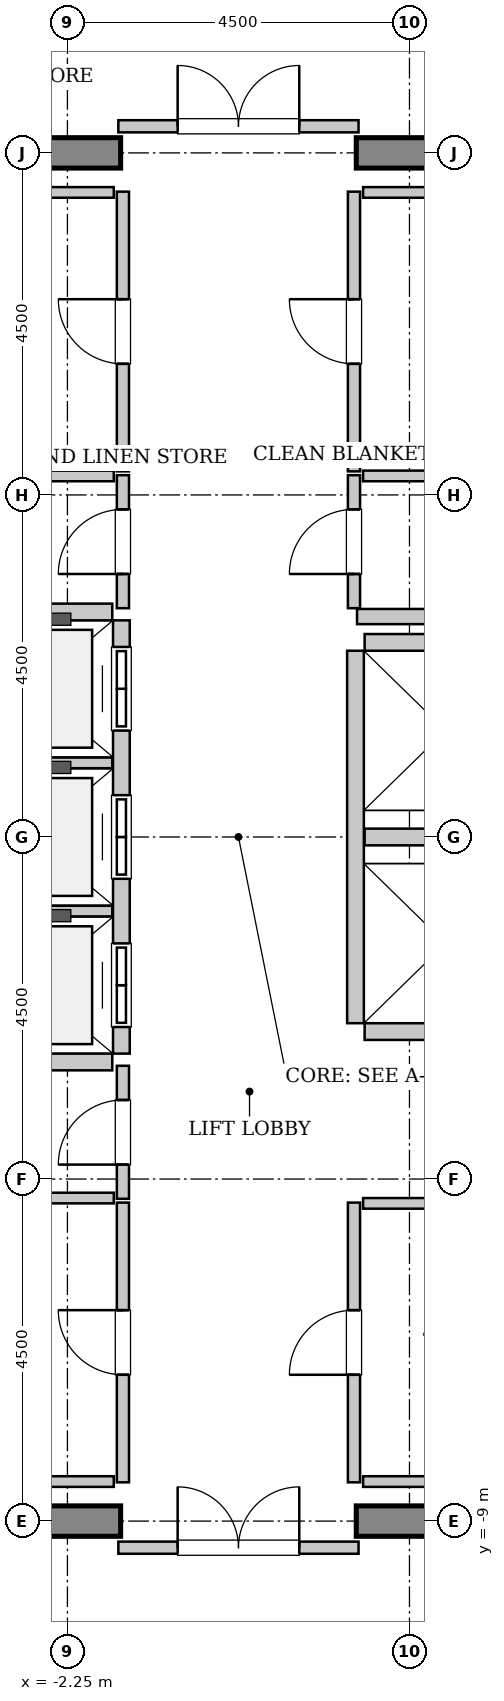
"""IFC4 building model, lengths in metres.
Left out: names, types, materials, properties, quantities, classifications, styles, units other than length and angle.
Written with IfcOpenShell. Run it as: python <this file> out.ifc"""

import sys

from ifc_helpers import new_model, si_unit, direction, frame, frame_2d, origin, place, context, subcontext, project, spatial, rectangle, extrude, source, transform, mapped, element, fill, save


model = new_model("IFC4")
c1 = context("Model", 3, precision=1e-05, world=origin(), true_north=direction((0.0, 1.0)))
c2 = subcontext(c1, "Body", "Model", "MODEL_VIEW")
j1 = project(units=[si_unit("LENGTHUNIT", "METRE"), si_unit("PLANEANGLEUNIT", "RADIAN")], contexts=[c1])
p1 = place(None, origin())
s1 = spatial("IfcSite", under=j1, at=p1, CompositionType="ELEMENT")
p2 = place(p1, origin())
s2 = spatial("IfcBuilding", under=s1, at=p2, CompositionType="ELEMENT")
p3 = place(p2, frame((0.0, 0.0, 333.8)))
s3 = spatial("IfcBuildingStorey", under=s2, at=p3, CompositionType="ELEMENT", Elevation=333.8)
m1 = source(origin(), c2, "Body", "SweptSolid", [
    extrude(rectangle(XDim=9.9, YDim=0.4, at=frame_2d((4.95, 0.0))), origin(), (0.0, 0.0, 1.0), 3.8),
])
for number, where, z_axis, x_axis in (
    (1, (-11.45, 9.0, 0.0), (0.0, 0.0, 1.0), (1.0, 0.0, 0.0)),
    (2, (1.55, 9.0, 0.0), (0.0, 0.0, 1.0), (1.0, 0.0, 0.0)),
    (3, (-11.45, -9.0, 0.0), (0.0, 0.0, 1.0), (1.0, 0.0, 0.0)),
    (4, (1.55, -9.0, 0.0), (0.0, 0.0, 1.0), (1.0, 0.0, 0.0)),
):
    element("IfcWall", number, at=place(p3, frame(where, z_axis=z_axis, x_axis=x_axis)), inside=s3, PredefinedType="SHEAR", context=c2, shape_type="MappedRepresentation", body=[
        mapped(m1, transform((0.0, 0.0, 0.0), x_axis=(1.0, 0.0, 0.0), y_axis=(0.0, 1.0, 0.0), z_axis=(0.0, 0.0, 1.0), scale=1.0)),
    ])
m2 = source(origin(), c2, "Body", "SweptSolid", [
    extrude(rectangle(XDim=5.7, YDim=0.22, at=frame_2d((2.85, 0.0))), origin(), (0.0, 0.0, 1.0), 3.535),
])
p4 = place(p3, frame((-1.54, -2.85, 0.0), z_axis=(0.0, 0.0, 1.0), x_axis=(0.0, 1.0, 0.0)))
e5 = element("IfcWall", 5, at=p4, inside=s3, PredefinedType="SOLIDWALL", context=c2, shape_type="MappedRepresentation", body=[
    mapped(m2, transform((0.0, 0.0, 0.0), x_axis=(1.0, 0.0, 0.0), y_axis=(0.0, 1.0, 0.0), z_axis=(0.0, 0.0, 1.0), scale=1.0)),
])
p5 = place(p4, frame((0.35, 0.0, 0.0)))
e6 = element("IfcOpeningElement", 6, at=p5, cuts=e5, PredefinedType="OPENING", context=c2, shape_type="SweptSolid", body=[
    extrude(rectangle(XDim=1.1, YDim=2.2, at=frame_2d((0.55, 1.1))), frame((0.0, 0.12, 0.0), z_axis=(0.0, -1.0, 0.0), x_axis=(1.0, 0.0, 0.0)), (0.0, 0.0, 1.0), 0.24),
])
p6 = place(p4, frame((2.3, 0.0, 0.0)))
e7 = element("IfcOpeningElement", 7, at=p6, cuts=e5, PredefinedType="OPENING", context=c2, shape_type="SweptSolid", body=[
    extrude(rectangle(XDim=1.1, YDim=2.2, at=frame_2d((0.55, 1.1))), frame((0.0, 0.12, 0.0), z_axis=(0.0, -1.0, 0.0), x_axis=(1.0, 0.0, 0.0)), (0.0, 0.0, 1.0), 0.24),
])
p7 = place(p4, frame((4.25, 0.0, 0.0)))
e8 = element("IfcOpeningElement", 8, at=p7, cuts=e5, PredefinedType="OPENING", context=c2, shape_type="SweptSolid", body=[
    extrude(rectangle(XDim=1.1, YDim=2.2, at=frame_2d((0.55, 1.1))), frame((0.0, 0.12, 0.0), z_axis=(0.0, -1.0, 0.0), x_axis=(1.0, 0.0, 0.0)), (0.0, 0.0, 1.0), 0.24),
])
m3 = source(origin(), c2, "Body", "SweptSolid", [
    extrude(rectangle(XDim=2.13, YDim=0.22, at=frame_2d((1.065, 0.0))), origin(), (0.0, 0.0, 1.0), 3.535),
])
p8 = place(p3, frame((-3.79, -2.96, 0.0), z_axis=(0.0, 0.0, 1.0), x_axis=(1.0, 0.0, 0.0)))
e9 = element("IfcWall", 9, at=p8, inside=s3, PredefinedType="SOLIDWALL", context=c2, shape_type="MappedRepresentation", body=[
    mapped(m3, transform((0.0, 0.0, 0.0), x_axis=(1.0, 0.0, 0.0), y_axis=(0.0, 1.0, 0.0), z_axis=(0.0, 0.0, 1.0), scale=1.0)),
])
m4 = source(origin(), c2, "Body", "SweptSolid", [
    extrude(rectangle(XDim=2.13, YDim=0.14, at=frame_2d((1.065, 0.0))), origin(), (0.0, 0.0, 1.0), 3.535),
])
for number, where, z_axis, x_axis in (
    (10, (-3.79, -0.975, 0.0), (0.0, 0.0, 1.0), (1.0, 0.0, 0.0)),
    (11, (-3.79, 0.975, 0.0), (0.0, 0.0, 1.0), (1.0, 0.0, 0.0)),
):
    element("IfcWall", number, at=place(p3, frame(where, z_axis=z_axis, x_axis=x_axis)), inside=s3, PredefinedType="PARTITIONING", context=c2, shape_type="MappedRepresentation", body=[
        mapped(m4, transform((0.0, 0.0, 0.0), x_axis=(1.0, 0.0, 0.0), y_axis=(0.0, 1.0, 0.0), z_axis=(0.0, 0.0, 1.0), scale=1.0)),
    ])
p9 = place(p3, frame((-1.66, 2.96, 0.0), z_axis=(0.0, 0.0, 1.0), x_axis=(-1.0, 0.0, 0.0)))
e12 = element("IfcWall", 12, at=p9, inside=s3, PredefinedType="SOLIDWALL", context=c2, shape_type="MappedRepresentation", body=[
    mapped(m3, transform((0.0, 0.0, 0.0), x_axis=(1.0, 0.0, 0.0), y_axis=(0.0, 1.0, 0.0), z_axis=(0.0, 0.0, 1.0), scale=1.0)),
])
m5 = source(origin(), c2, "Body", "SweptSolid", [
    extrude(rectangle(XDim=4.9, YDim=0.22, at=frame_2d((2.45, 0.0))), origin(), (0.0, 0.0, 1.0), 3.535),
])
p10 = place(p3, frame((1.54, 2.45, 0.0), z_axis=(0.0, 0.0, 1.0), x_axis=(0.0, -1.0, 0.0)))
e13 = element("IfcWall", 13, at=p10, inside=s3, PredefinedType="SOLIDWALL", context=c2, shape_type="MappedRepresentation", body=[
    mapped(m5, transform((0.0, 0.0, 0.0), x_axis=(1.0, 0.0, 0.0), y_axis=(0.0, 1.0, 0.0), z_axis=(0.0, 0.0, 1.0), scale=1.0)),
])
for number, where, z_axis, x_axis in (
    (14, (1.66, -2.56, 0.0), (0.0, 0.0, 1.0), (1.0, 0.0, 0.0)),
    (15, (1.66, 0.0, 0.0), (0.0, 0.0, 1.0), (1.0, 0.0, 0.0)),
    (16, (3.79, 2.56, 0.0), (0.0, 0.0, 1.0), (-1.0, 0.0, 0.0)),
):
    element("IfcWall", number, at=place(p3, frame(where, z_axis=z_axis, x_axis=x_axis)), inside=s3, PredefinedType="SOLIDWALL", context=c2, shape_type="MappedRepresentation", body=[
        mapped(m3, transform((0.0, 0.0, 0.0), x_axis=(1.0, 0.0, 0.0), y_axis=(0.0, 1.0, 0.0), z_axis=(0.0, 0.0, 1.0), scale=1.0)),
    ])
m6 = source(origin(), c2, "Body", "SweptSolid", [
    extrude(rectangle(XDim=2.52, YDim=0.2, at=frame_2d((1.26, 0.0))), origin(), (0.0, 0.0, 1.0), 3.535),
])
p11 = place(p3, frame((1.56, 2.9, 0.0), z_axis=(0.0, 0.0, 1.0), x_axis=(1.0, 0.0, 0.0)))
e17 = element("IfcWall", 17, at=p11, inside=s3, PredefinedType="PARTITIONING", context=c2, shape_type="MappedRepresentation", body=[
    mapped(m6, transform((0.0, 0.0, 0.0), x_axis=(1.0, 0.0, 0.0), y_axis=(0.0, 1.0, 0.0), z_axis=(0.0, 0.0, 1.0), scale=1.0)),
])
m7 = source(origin(), c2, "Body", "SweptSolid", [
    extrude(rectangle(XDim=3.16, YDim=0.16, at=frame_2d((1.58, 0.0))), origin(), (0.0, 0.0, 1.0), 2.625),
])
p12 = place(p3, frame((-1.58, 9.35, 0.0), z_axis=(0.0, 0.0, 1.0), x_axis=(1.0, 0.0, 0.0)))
e18 = element("IfcWall", 18, at=p12, inside=s3, PredefinedType="PARTITIONING", context=c2, shape_type="MappedRepresentation", body=[
    mapped(m7, transform((0.0, 0.0, 0.0), x_axis=(1.0, 0.0, 0.0), y_axis=(0.0, 1.0, 0.0), z_axis=(0.0, 0.0, 1.0), scale=1.0)),
])
p13 = place(p12, frame((0.78, 0.0, 0.0)))
e19 = element("IfcOpeningElement", 19, at=p13, cuts=e18, PredefinedType="OPENING", context=c2, shape_type="SweptSolid", body=[
    extrude(rectangle(XDim=1.6, YDim=2.3, at=frame_2d((0.8, 1.15))), frame((0.0, 0.09, 0.0), z_axis=(0.0, -1.0, 0.0), x_axis=(1.0, 0.0, 0.0)), (0.0, 0.0, 1.0), 0.18),
])
p14 = place(p3, frame((-1.58, -9.35, 0.0), z_axis=(0.0, 0.0, 1.0), x_axis=(1.0, 0.0, 0.0)))
e20 = element("IfcWall", 20, at=p14, inside=s3, PredefinedType="PARTITIONING", context=c2, shape_type="MappedRepresentation", body=[
    mapped(m7, transform((0.0, 0.0, 0.0), x_axis=(1.0, 0.0, 0.0), y_axis=(0.0, 1.0, 0.0), z_axis=(0.0, 0.0, 1.0), scale=1.0)),
])
p15 = place(p14, frame((0.78, 0.0, 0.0)))
e21 = element("IfcOpeningElement", 21, at=p15, cuts=e20, PredefinedType="OPENING", context=c2, shape_type="SweptSolid", body=[
    extrude(rectangle(XDim=1.6, YDim=2.3, at=frame_2d((0.8, 1.15))), frame((0.0, 0.09, 0.0), z_axis=(0.0, -1.0, 0.0), x_axis=(1.0, 0.0, 0.0)), (0.0, 0.0, 1.0), 0.18),
])
m8 = source(origin(), c2, "Body", "SweptSolid", [
    extrude(rectangle(XDim=1.75, YDim=0.16, at=frame_2d((0.875, 0.0))), origin(), (0.0, 0.0, 1.0), 3.535),
])
p16 = place(p3, frame((-1.52, 3.01, 0.0), z_axis=(0.0, 0.0, 1.0), x_axis=(0.0, 1.0, 0.0)))
e22 = element("IfcWall", 22, at=p16, inside=s3, PredefinedType="PARTITIONING", context=c2, shape_type="MappedRepresentation", body=[
    mapped(m8, transform((0.0, 0.0, 0.0), x_axis=(1.0, 0.0, 0.0), y_axis=(0.0, 1.0, 0.0), z_axis=(0.0, 0.0, 1.0), scale=1.0)),
])
p17 = place(p16, frame((0.45, 0.0, 0.0)))
e23 = element("IfcOpeningElement", 23, at=p17, cuts=e22, PredefinedType="OPENING", context=c2, shape_type="SweptSolid", body=[
    extrude(rectangle(XDim=0.85, YDim=2.1, at=frame_2d((0.425, 1.05))), frame((0.0, 0.09, 0.0), z_axis=(0.0, -1.0, 0.0), x_axis=(1.0, 0.0, 0.0)), (0.0, 0.0, 1.0), 0.18),
])
m9 = source(origin(), c2, "Body", "SweptSolid", [
    extrude(rectangle(XDim=2.95, YDim=0.14, at=frame_2d((1.475, 0.0))), origin(), (0.0, 0.0, 1.0), 3.535),
])
p18 = place(p3, frame((-4.59, 4.75, 0.0), z_axis=(0.0, 0.0, 1.0), x_axis=(1.0, 0.0, 0.0)))
e24 = element("IfcWall", 24, at=p18, inside=s3, PredefinedType="PARTITIONING", context=c2, shape_type="MappedRepresentation", body=[
    mapped(m9, transform((0.0, 0.0, 0.0), x_axis=(1.0, 0.0, 0.0), y_axis=(0.0, 1.0, 0.0), z_axis=(0.0, 0.0, 1.0), scale=1.0)),
])
m10 = source(origin(), c2, "Body", "SweptSolid", [
    extrude(rectangle(XDim=3.68, YDim=0.16, at=frame_2d((1.84, 0.0))), origin(), (0.0, 0.0, 1.0), 3.535),
])
p19 = place(p3, frame((-1.52, 4.81, 0.0), z_axis=(0.0, 0.0, 1.0), x_axis=(0.0, 1.0, 0.0)))
e25 = element("IfcWall", 25, at=p19, inside=s3, PredefinedType="PARTITIONING", context=c2, shape_type="MappedRepresentation", body=[
    mapped(m10, transform((0.0, 0.0, 0.0), x_axis=(1.0, 0.0, 0.0), y_axis=(0.0, 1.0, 0.0), z_axis=(0.0, 0.0, 1.0), scale=1.0)),
])
p20 = place(p19, frame((1.415, 0.0, 0.0)))
e26 = element("IfcOpeningElement", 26, at=p20, cuts=e25, PredefinedType="OPENING", context=c2, shape_type="SweptSolid", body=[
    extrude(rectangle(XDim=0.85, YDim=2.1, at=frame_2d((0.425, 1.05))), frame((0.0, 0.09, 0.0), z_axis=(0.0, -1.0, 0.0), x_axis=(1.0, 0.0, 0.0)), (0.0, 0.0, 1.0), 0.18),
])
m11 = source(origin(), c2, "Body", "SweptSolid", [
    extrude(rectangle(XDim=3.15, YDim=0.14, at=frame_2d((1.575, 0.0))), origin(), (0.0, 0.0, 1.0), 3.535),
])
p21 = place(p3, frame((-4.79, 8.48, 0.0), z_axis=(0.0, 0.0, 1.0), x_axis=(1.0, 0.0, 0.0)))
e27 = element("IfcWall", 27, at=p21, inside=s3, PredefinedType="PARTITIONING", context=c2, shape_type="MappedRepresentation", body=[
    mapped(m11, transform((0.0, 0.0, 0.0), x_axis=(1.0, 0.0, 0.0), y_axis=(0.0, 1.0, 0.0), z_axis=(0.0, 0.0, 1.0), scale=1.0)),
])
p22 = place(p3, frame((1.52, 3.01, 0.0), z_axis=(0.0, 0.0, 1.0), x_axis=(0.0, 1.0, 0.0)))
e28 = element("IfcWall", 28, at=p22, inside=s3, PredefinedType="PARTITIONING", context=c2, shape_type="MappedRepresentation", body=[
    mapped(m8, transform((0.0, 0.0, 0.0), x_axis=(1.0, 0.0, 0.0), y_axis=(0.0, 1.0, 0.0), z_axis=(0.0, 0.0, 1.0), scale=1.0)),
])
p23 = place(p22, frame((0.45, 0.0, 0.0)))
e29 = element("IfcOpeningElement", 29, at=p23, cuts=e28, PredefinedType="OPENING", context=c2, shape_type="SweptSolid", body=[
    extrude(rectangle(XDim=0.85, YDim=2.1, at=frame_2d((0.425, 1.05))), frame((0.0, 0.09, 0.0), z_axis=(0.0, -1.0, 0.0), x_axis=(1.0, 0.0, 0.0)), (0.0, 0.0, 1.0), 0.18),
])
p24 = place(p3, frame((1.64, 4.75, 0.0), z_axis=(0.0, 0.0, 1.0), x_axis=(1.0, 0.0, 0.0)))
e30 = element("IfcWall", 30, at=p24, inside=s3, PredefinedType="PARTITIONING", context=c2, shape_type="MappedRepresentation", body=[
    mapped(m11, transform((0.0, 0.0, 0.0), x_axis=(1.0, 0.0, 0.0), y_axis=(0.0, 1.0, 0.0), z_axis=(0.0, 0.0, 1.0), scale=1.0)),
])
p25 = place(p3, frame((1.52, 4.81, 0.0), z_axis=(0.0, 0.0, 1.0), x_axis=(0.0, 1.0, 0.0)))
e31 = element("IfcWall", 31, at=p25, inside=s3, PredefinedType="PARTITIONING", context=c2, shape_type="MappedRepresentation", body=[
    mapped(m10, transform((0.0, 0.0, 0.0), x_axis=(1.0, 0.0, 0.0), y_axis=(0.0, 1.0, 0.0), z_axis=(0.0, 0.0, 1.0), scale=1.0)),
])
p26 = place(p25, frame((1.415, 0.0, 0.0)))
e32 = element("IfcOpeningElement", 32, at=p26, cuts=e31, PredefinedType="OPENING", context=c2, shape_type="SweptSolid", body=[
    extrude(rectangle(XDim=0.85, YDim=2.1, at=frame_2d((0.425, 1.05))), frame((0.0, 0.09, 0.0), z_axis=(0.0, -1.0, 0.0), x_axis=(1.0, 0.0, 0.0)), (0.0, 0.0, 1.0), 0.18),
])
p27 = place(p3, frame((1.64, 8.48, 0.0), z_axis=(0.0, 0.0, 1.0), x_axis=(1.0, 0.0, 0.0)))
e33 = element("IfcWall", 33, at=p27, inside=s3, PredefinedType="PARTITIONING", context=c2, shape_type="MappedRepresentation", body=[
    mapped(m11, transform((0.0, 0.0, 0.0), x_axis=(1.0, 0.0, 0.0), y_axis=(0.0, 1.0, 0.0), z_axis=(0.0, 0.0, 1.0), scale=1.0)),
])
p28 = place(p3, frame((-1.52, -4.76, 0.0), z_axis=(0.0, 0.0, 1.0), x_axis=(0.0, 1.0, 0.0)))
e34 = element("IfcWall", 34, at=p28, inside=s3, PredefinedType="PARTITIONING", context=c2, shape_type="MappedRepresentation", body=[
    mapped(m8, transform((0.0, 0.0, 0.0), x_axis=(1.0, 0.0, 0.0), y_axis=(0.0, 1.0, 0.0), z_axis=(0.0, 0.0, 1.0), scale=1.0)),
])
p29 = place(p28, frame((0.45, 0.0, 0.0)))
e35 = element("IfcOpeningElement", 35, at=p29, cuts=e34, PredefinedType="OPENING", context=c2, shape_type="SweptSolid", body=[
    extrude(rectangle(XDim=0.85, YDim=2.1, at=frame_2d((0.425, 1.05))), frame((0.0, 0.09, 0.0), z_axis=(0.0, -1.0, 0.0), x_axis=(1.0, 0.0, 0.0)), (0.0, 0.0, 1.0), 0.18),
])
p30 = place(p3, frame((-4.79, -4.75, 0.0), z_axis=(0.0, 0.0, 1.0), x_axis=(1.0, 0.0, 0.0)))
e36 = element("IfcWall", 36, at=p30, inside=s3, PredefinedType="PARTITIONING", context=c2, shape_type="MappedRepresentation", body=[
    mapped(m11, transform((0.0, 0.0, 0.0), x_axis=(1.0, 0.0, 0.0), y_axis=(0.0, 1.0, 0.0), z_axis=(0.0, 0.0, 1.0), scale=1.0)),
])
p31 = place(p3, frame((-1.52, -8.49, 0.0), z_axis=(0.0, 0.0, 1.0), x_axis=(0.0, 1.0, 0.0)))
e37 = element("IfcWall", 37, at=p31, inside=s3, PredefinedType="PARTITIONING", context=c2, shape_type="MappedRepresentation", body=[
    mapped(m10, transform((0.0, 0.0, 0.0), x_axis=(1.0, 0.0, 0.0), y_axis=(0.0, 1.0, 0.0), z_axis=(0.0, 0.0, 1.0), scale=1.0)),
])
p32 = place(p31, frame((1.415, 0.0, 0.0)))
e38 = element("IfcOpeningElement", 38, at=p32, cuts=e37, PredefinedType="OPENING", context=c2, shape_type="SweptSolid", body=[
    extrude(rectangle(XDim=0.85, YDim=2.1, at=frame_2d((0.425, 1.05))), frame((0.0, 0.09, 0.0), z_axis=(0.0, -1.0, 0.0), x_axis=(1.0, 0.0, 0.0)), (0.0, 0.0, 1.0), 0.18),
])
m12 = source(origin(), c2, "Body", "SweptSolid", [
    extrude(rectangle(XDim=3.03, YDim=0.14, at=frame_2d((1.515, 0.0))), origin(), (0.0, 0.0, 1.0), 3.535),
])
p33 = place(p3, frame((-4.67, -8.48, 0.0), z_axis=(0.0, 0.0, 1.0), x_axis=(1.0, 0.0, 0.0)))
e39 = element("IfcWall", 39, at=p33, inside=s3, PredefinedType="PARTITIONING", context=c2, shape_type="MappedRepresentation", body=[
    mapped(m12, transform((0.0, 0.0, 0.0), x_axis=(1.0, 0.0, 0.0), y_axis=(0.0, 1.0, 0.0), z_axis=(0.0, 0.0, 1.0), scale=1.0)),
])
p34 = place(p3, frame((1.52, -8.49, 0.0), z_axis=(0.0, 0.0, 1.0), x_axis=(0.0, 1.0, 0.0)))
e40 = element("IfcWall", 40, at=p34, inside=s3, PredefinedType="PARTITIONING", context=c2, shape_type="MappedRepresentation", body=[
    mapped(m10, transform((0.0, 0.0, 0.0), x_axis=(1.0, 0.0, 0.0), y_axis=(0.0, 1.0, 0.0), z_axis=(0.0, 0.0, 1.0), scale=1.0)),
])
p35 = place(p34, frame((1.415, 0.0, 0.0)))
e41 = element("IfcOpeningElement", 41, at=p35, cuts=e40, PredefinedType="OPENING", context=c2, shape_type="SweptSolid", body=[
    extrude(rectangle(XDim=0.85, YDim=2.1, at=frame_2d((0.425, 1.05))), frame((0.0, 0.09, 0.0), z_axis=(0.0, -1.0, 0.0), x_axis=(1.0, 0.0, 0.0)), (0.0, 0.0, 1.0), 0.18),
])
p36 = place(p3, frame((1.64, -4.82, 0.0), z_axis=(0.0, 0.0, 1.0), x_axis=(1.0, 0.0, 0.0)))
e42 = element("IfcWall", 42, at=p36, inside=s3, PredefinedType="PARTITIONING", context=c2, shape_type="MappedRepresentation", body=[
    mapped(m9, transform((0.0, 0.0, 0.0), x_axis=(1.0, 0.0, 0.0), y_axis=(0.0, 1.0, 0.0), z_axis=(0.0, 0.0, 1.0), scale=1.0)),
])
p37 = place(p3, frame((1.64, -8.48, 0.0), z_axis=(0.0, 0.0, 1.0), x_axis=(1.0, 0.0, 0.0)))
e43 = element("IfcWall", 43, at=p37, inside=s3, PredefinedType="PARTITIONING", context=c2, shape_type="MappedRepresentation", body=[
    mapped(m11, transform((0.0, 0.0, 0.0), x_axis=(1.0, 0.0, 0.0), y_axis=(0.0, 1.0, 0.0), z_axis=(0.0, 0.0, 1.0), scale=1.0)),
])
m13 = source(origin(), c2, "Body", "SweptSolid", [
    extrude(rectangle(XDim=1.1, YDim=2.2, at=frame_2d((0.55, 1.1))), frame((0.0, 0.025, 0.0), z_axis=(0.0, -1.0, 0.0), x_axis=(1.0, 0.0, 0.0)), (0.0, 0.0, 1.0), 0.05),
])
p38 = place(p5, origin())
e44 = element("IfcDoor", 44, at=p38, inside=s3, OperationType="DOUBLE_DOOR_SLIDING", PredefinedType="DOOR", context=c2, shape_type="MappedRepresentation", body=[
    mapped(m13, transform((0.0, 0.0, 0.0), x_axis=(1.0, 0.0, 0.0), y_axis=(0.0, 1.0, 0.0), z_axis=(0.0, 0.0, 1.0), scale=1.0)),
])
fill(e6, e44)
p39 = place(p6, origin())
e45 = element("IfcDoor", 45, at=p39, inside=s3, OperationType="DOUBLE_DOOR_SLIDING", PredefinedType="DOOR", context=c2, shape_type="MappedRepresentation", body=[
    mapped(m13, transform((0.0, 0.0, 0.0), x_axis=(1.0, 0.0, 0.0), y_axis=(0.0, 1.0, 0.0), z_axis=(0.0, 0.0, 1.0), scale=1.0)),
])
fill(e7, e45)
p40 = place(p7, origin())
e46 = element("IfcDoor", 46, at=p40, inside=s3, OperationType="DOUBLE_DOOR_SLIDING", PredefinedType="DOOR", context=c2, shape_type="MappedRepresentation", body=[
    mapped(m13, transform((0.0, 0.0, 0.0), x_axis=(1.0, 0.0, 0.0), y_axis=(0.0, 1.0, 0.0), z_axis=(0.0, 0.0, 1.0), scale=1.0)),
])
fill(e8, e46)
m14 = source(origin(), c2, "Body", "SweptSolid", [
    extrude(rectangle(XDim=1.6, YDim=2.3, at=frame_2d((0.8, 1.15))), frame((0.0, 0.025, 0.0), z_axis=(0.0, -1.0, 0.0), x_axis=(1.0, 0.0, 0.0)), (0.0, 0.0, 1.0), 0.05),
])
p41 = place(p13, origin())
e47 = element("IfcDoor", 47, at=p41, inside=s3, OperationType="DOUBLE_DOOR_SINGLE_SWING", PredefinedType="DOOR", context=c2, shape_type="MappedRepresentation", body=[
    mapped(m14, transform((0.0, 0.0, 0.0), x_axis=(1.0, 0.0, 0.0), y_axis=(0.0, 1.0, 0.0), z_axis=(0.0, 0.0, 1.0), scale=1.0)),
])
fill(e19, e47)
p42 = place(p15, origin())
e48 = element("IfcDoor", 48, at=p42, inside=s3, OperationType="DOUBLE_DOOR_SINGLE_SWING", PredefinedType="DOOR", context=c2, shape_type="MappedRepresentation", body=[
    mapped(m14, transform((0.0, 0.0, 0.0), x_axis=(1.0, 0.0, 0.0), y_axis=(0.0, 1.0, 0.0), z_axis=(0.0, 0.0, 1.0), scale=1.0)),
])
fill(e21, e48)
m15 = source(origin(), c2, "Body", "SweptSolid", [
    extrude(rectangle(XDim=0.85, YDim=2.1, at=frame_2d((0.425, 1.05))), frame((0.0, 0.025, 0.0), z_axis=(0.0, -1.0, 0.0), x_axis=(1.0, 0.0, 0.0)), (0.0, 0.0, 1.0), 0.05),
])
p43 = place(p17, origin())
e49 = element("IfcDoor", 49, at=p43, inside=s3, OperationType="SINGLE_SWING_LEFT", PredefinedType="DOOR", context=c2, shape_type="MappedRepresentation", body=[
    mapped(m15, transform((0.0, 0.0, 0.0), x_axis=(1.0, 0.0, 0.0), y_axis=(0.0, 1.0, 0.0), z_axis=(0.0, 0.0, 1.0), scale=1.0)),
])
fill(e23, e49)
p44 = place(p20, origin())
e50 = element("IfcDoor", 50, at=p44, inside=s3, OperationType="SINGLE_SWING_RIGHT", PredefinedType="DOOR", context=c2, shape_type="MappedRepresentation", body=[
    mapped(m15, transform((0.0, 0.0, 0.0), x_axis=(1.0, 0.0, 0.0), y_axis=(0.0, 1.0, 0.0), z_axis=(0.0, 0.0, 1.0), scale=1.0)),
])
fill(e26, e50)
p45 = place(p23, origin())
e51 = element("IfcDoor", 51, at=p45, inside=s3, OperationType="SINGLE_SWING_LEFT", PredefinedType="DOOR", context=c2, shape_type="MappedRepresentation", body=[
    mapped(m15, transform((0.0, 0.0, 0.0), x_axis=(1.0, 0.0, 0.0), y_axis=(0.0, 1.0, 0.0), z_axis=(0.0, 0.0, 1.0), scale=1.0)),
])
fill(e29, e51)
p46 = place(p26, origin())
e52 = element("IfcDoor", 52, at=p46, inside=s3, OperationType="SINGLE_SWING_RIGHT", PredefinedType="DOOR", context=c2, shape_type="MappedRepresentation", body=[
    mapped(m15, transform((0.0, 0.0, 0.0), x_axis=(1.0, 0.0, 0.0), y_axis=(0.0, 1.0, 0.0), z_axis=(0.0, 0.0, 1.0), scale=1.0)),
])
fill(e32, e52)
p47 = place(p29, origin())
e53 = element("IfcDoor", 53, at=p47, inside=s3, OperationType="SINGLE_SWING_LEFT", PredefinedType="DOOR", context=c2, shape_type="MappedRepresentation", body=[
    mapped(m15, transform((0.0, 0.0, 0.0), x_axis=(1.0, 0.0, 0.0), y_axis=(0.0, 1.0, 0.0), z_axis=(0.0, 0.0, 1.0), scale=1.0)),
])
fill(e35, e53)
p48 = place(p32, origin())
e54 = element("IfcDoor", 54, at=p48, inside=s3, OperationType="SINGLE_SWING_RIGHT", PredefinedType="DOOR", context=c2, shape_type="MappedRepresentation", body=[
    mapped(m15, transform((0.0, 0.0, 0.0), x_axis=(1.0, 0.0, 0.0), y_axis=(0.0, 1.0, 0.0), z_axis=(0.0, 0.0, 1.0), scale=1.0)),
])
fill(e38, e54)
p49 = place(p35, origin())
e55 = element("IfcDoor", 55, at=p49, inside=s3, OperationType="SINGLE_SWING_LEFT", PredefinedType="DOOR", context=c2, shape_type="MappedRepresentation", body=[
    mapped(m15, transform((0.0, 0.0, 0.0), x_axis=(1.0, 0.0, 0.0), y_axis=(0.0, 1.0, 0.0), z_axis=(0.0, 0.0, 1.0), scale=1.0)),
])
fill(e41, e55)
save(model, sys.argv[1])
